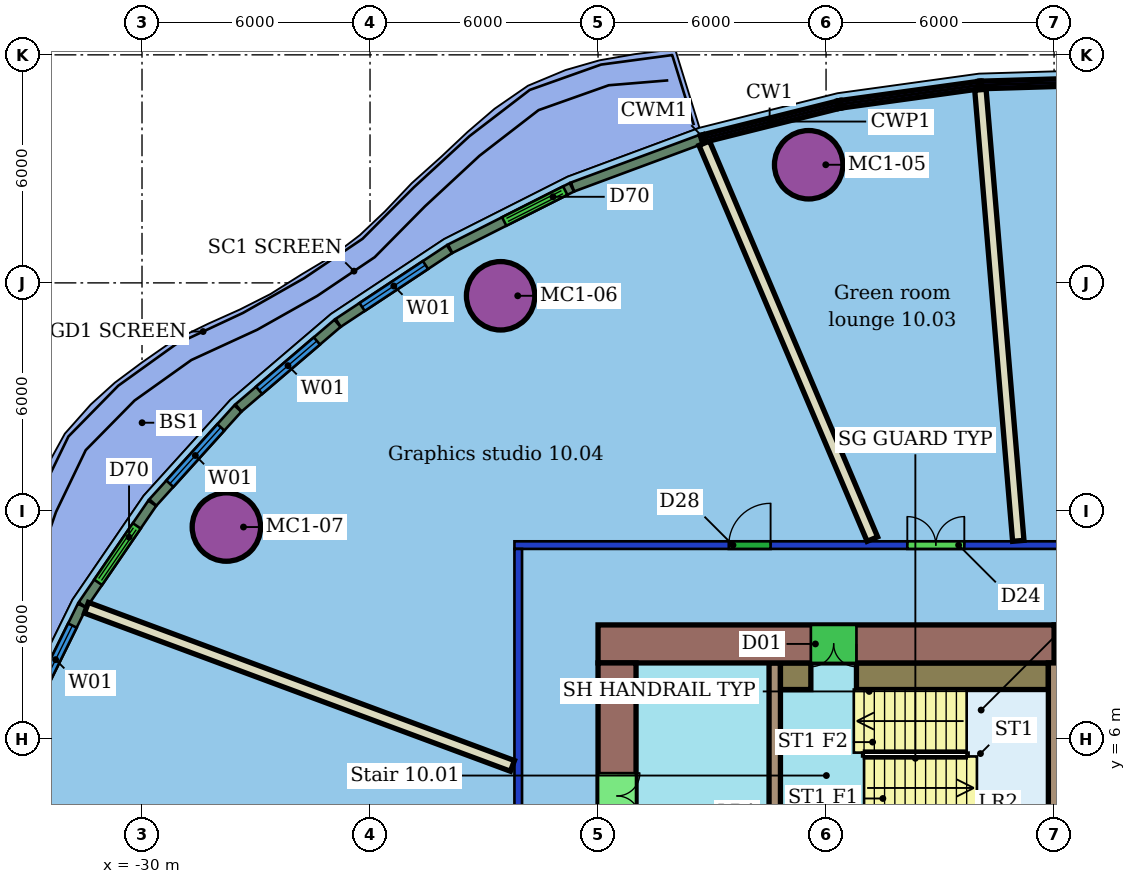
"""IFC4 building model, lengths in metres.
Left out: names, types, materials, properties, quantities, classifications, styles, units other than length and angle.
Written with IfcOpenShell. Run it as: python <this file> out.ifc"""

import sys

from ifc_helpers import new_model, si_unit, direction, frame, frame_2d, origin, origin_2d, place, context, subcontext, project, spatial, rectangle, hollow_circle, extrude, element, fill, save


model = new_model("IFC4")
c1 = context("Model", 3, precision=1e-05, world=origin(), true_north=direction((0.0, 1.0)))
c2 = subcontext(c1, "Body", "Model", "MODEL_VIEW")
j1 = project(units=[si_unit("LENGTHUNIT", "METRE"), si_unit("PLANEANGLEUNIT", "RADIAN")], contexts=[c1])
p1 = place(None, origin())
s1 = spatial("IfcSite", under=j1, at=p1, CompositionType="ELEMENT")
p2 = place(p1, origin())
s2 = spatial("IfcBuilding", under=s1, at=p2, CompositionType="ELEMENT")
p3 = place(p2, frame((0.0, 0.0, 54.5)))
s3 = spatial("IfcBuildingStorey", under=s2, at=p3, CompositionType="ELEMENT", Elevation=54.5)
for number, where, z_axis, x_axis in (
    (1, (-12.458, 21.108, 0.0), (0.0, 0.0, 1.0), (1.0, 0.0, 0.0)),
    (2, (-20.563, 17.66, 0.0), (0.0, 0.0, 1.0), (1.0, 0.0, 0.0)),
    (3, (-27.78, 11.576, 0.0), (0.0, 0.0, 1.0), (1.0, 0.0, 0.0)),
):
    element("IfcColumn", number, at=place(p3, frame(where, z_axis=z_axis, x_axis=x_axis)), inside=s3, PredefinedType="COLUMN", context=c2, shape_type="SweptSolid", body=[
        extrude(hollow_circle(Radius=0.9, WallThickness=0.06, at=origin_2d()), origin(), (0.0, 0.0, 1.0), 3.55),
    ])
p4 = place(p3, frame((-20.1, -11.0, 0.0), z_axis=(0.0, 0.0, 1.0), x_axis=(0.0, 1.0, 0.0)))
e4 = element("IfcWall", 4, at=p4, inside=s3, PredefinedType="PARTITIONING", context=c2, shape_type="SweptSolid", body=[
    extrude(rectangle(XDim=22.0, YDim=0.2, at=frame_2d((11.0, 0.0))), origin(), (0.0, 0.0, 1.0), 2.85),
])
p5 = place(p4, frame((11.384, 0.0, 0.0)))
e5 = element("IfcOpeningElement", 5, at=p5, cuts=e4, PredefinedType="OPENING", context=c2, shape_type="SweptSolid", body=[
    extrude(rectangle(XDim=1.8, YDim=2.1, at=frame_2d((0.9, 1.05))), frame((0.0, 0.11, 0.0), z_axis=(0.0, -1.0, 0.0), x_axis=(1.0, 0.0, 0.0)), (0.0, 0.0, 1.0), 0.22),
])
p6 = place(p3, frame((-20.2, 11.1, 0.0), z_axis=(0.0, 0.0, 1.0), x_axis=(1.0, 0.0, 0.0)))
e6 = element("IfcWall", 6, at=p6, inside=s3, PredefinedType="PARTITIONING", context=c2, shape_type="SweptSolid", body=[
    extrude(rectangle(XDim=28.4, YDim=0.2, at=frame_2d((14.2, 0.0))), origin(), (0.0, 0.0, 1.0), 2.85),
])
p7 = place(p6, frame((24.567, 0.0, 0.0)))
e7 = element("IfcOpeningElement", 7, at=p7, cuts=e6, PredefinedType="OPENING", context=c2, shape_type="SweptSolid", body=[
    extrude(rectangle(XDim=1.1, YDim=2.1, at=frame_2d((0.55, 1.05))), frame((0.0, 0.11, 0.0), z_axis=(0.0, -1.0, 0.0), x_axis=(1.0, 0.0, 0.0)), (0.0, 0.0, 1.0), 0.22),
])
p8 = place(p6, frame((19.115, 0.0, 0.0)))
e8 = element("IfcOpeningElement", 8, at=p8, cuts=e6, PredefinedType="OPENING", context=c2, shape_type="SweptSolid", body=[
    extrude(rectangle(XDim=1.2, YDim=2.1, at=frame_2d((0.6, 1.05))), frame((0.0, 0.11, 0.0), z_axis=(0.0, -1.0, 0.0), x_axis=(1.0, 0.0, 0.0)), (0.0, 0.0, 1.0), 0.22),
])
p9 = place(p6, frame((10.338, 0.0, 0.0)))
e9 = element("IfcOpeningElement", 9, at=p9, cuts=e6, PredefinedType="OPENING", context=c2, shape_type="SweptSolid", body=[
    extrude(rectangle(XDim=1.5, YDim=2.1, at=frame_2d((0.75, 1.05))), frame((0.0, 0.11, 0.0), z_axis=(0.0, -1.0, 0.0), x_axis=(1.0, 0.0, 0.0)), (0.0, 0.0, 1.0), 0.22),
])
p10 = place(p6, frame((5.64, 0.0, 0.0)))
e10 = element("IfcOpeningElement", 10, at=p10, cuts=e6, PredefinedType="OPENING", context=c2, shape_type="SweptSolid", body=[
    extrude(rectangle(XDim=1.1, YDim=2.1, at=frame_2d((0.55, 1.05))), frame((0.0, 0.11, 0.0), z_axis=(0.0, -1.0, 0.0), x_axis=(1.0, 0.0, 0.0)), (0.0, 0.0, 1.0), 0.22),
])
p11 = place(p3, frame((-7.938, 23.082, 0.0), z_axis=(0.0, 0.0, 1.0), x_axis=(0.083668001416, -0.996493685649, 0.0)))
e11 = element("IfcWall", 11, at=p11, inside=s3, PredefinedType="PARTITIONING", context=c2, shape_type="SweptSolid", body=[
    extrude(rectangle(XDim=11.911, YDim=0.3, at=frame_2d((5.956, 0.0))), origin(), (0.0, 0.0, 1.0), 3.55),
])
p12 = place(p3, frame((-15.205, 21.675, 0.0), z_axis=(0.0, 0.0, 1.0), x_axis=(0.39088389437, -0.920439993222, 0.0)))
e12 = element("IfcWall", 12, at=p12, inside=s3, PredefinedType="PARTITIONING", context=c2, shape_type="SweptSolid", body=[
    extrude(rectangle(XDim=11.317, YDim=0.3, at=frame_2d((5.658, 0.0))), origin(), (0.0, 0.0, 1.0), 3.55),
])
p13 = place(p3, frame((-31.462, 9.452, 0.0), z_axis=(0.0, 0.0, 1.0), x_axis=(0.937492850548, -0.348004533262, 0.0)))
e13 = element("IfcWall", 13, at=p13, inside=s3, PredefinedType="PARTITIONING", context=c2, shape_type="SweptSolid", body=[
    extrude(rectangle(XDim=11.957, YDim=0.3, at=frame_2d((5.979, 0.0))), origin(), (0.0, 0.0, 1.0), 3.55),
])
p14 = place(p3, frame((-15.294, 21.775, 0.0), z_axis=(0.0, 0.0, 1.0), x_axis=(-0.937607214699, -0.347696291244, 0.0)))
e14 = element("IfcWall", 14, at=p14, inside=s3, PredefinedType="SOLIDWALL", context=c2, shape_type="SweptSolid", body=[
    extrude(rectangle(XDim=3.601, YDim=0.25, at=frame_2d((1.801, 0.0))), origin(), (0.0, 0.0, 1.0), 3.15),
])
p15 = place(p3, frame((-18.691, 20.514, 0.0), z_axis=(0.0, 0.0, 1.0), x_axis=(-0.892553821927, -0.45094087746, 0.0)))
e15 = element("IfcWall", 15, at=p15, inside=s3, PredefinedType="SOLIDWALL", context=c2, shape_type="SweptSolid", body=[
    extrude(rectangle(XDim=3.586, YDim=0.25, at=frame_2d((1.793, 0.0))), origin(), (0.0, 0.0, 1.0), 3.15),
])
p16 = place(p15, frame((0.193, 0.0, 0.0)))
e16 = element("IfcOpeningElement", 16, at=p16, cuts=e15, PredefinedType="OPENING", context=c2, shape_type="SweptSolid", body=[
    extrude(rectangle(XDim=1.8, YDim=2.4, at=frame_2d((0.9, 1.2))), frame((0.0, 0.135, 0.0), z_axis=(0.0, -1.0, 0.0), x_axis=(1.0, 0.0, 0.0)), (0.0, 0.0, 1.0), 0.27),
])
p17 = place(p3, frame((-21.911, 18.886, 0.0), z_axis=(0.0, 0.0, 1.0), x_axis=(-0.833854064254, -0.551984963135, 0.0)))
e17 = element("IfcWall", 17, at=p17, inside=s3, PredefinedType="SOLIDWALL", context=c2, shape_type="SweptSolid", body=[
    extrude(rectangle(XDim=3.51, YDim=0.25, at=frame_2d((1.755, 0.0))), origin(), (0.0, 0.0, 1.0), 3.15),
])
p18 = place(p17, frame((0.755, 0.0, 0.8)))
e18 = element("IfcOpeningElement", 18, at=p18, cuts=e17, PredefinedType="OPENING", context=c2, shape_type="SweptSolid", body=[
    extrude(rectangle(XDim=2.0, YDim=2.2, at=frame_2d((1.0, 1.1))), frame((0.0, 0.135, 0.0), z_axis=(0.0, -1.0, 0.0), x_axis=(1.0, 0.0, 0.0)), (0.0, 0.0, 1.0), 0.27),
])
p19 = place(p3, frame((-24.856, 16.935, 0.0), z_axis=(0.0, 0.0, 1.0), x_axis=(-0.760387612855, -0.649469536019, 0.0)))
e19 = element("IfcWall", 19, at=p19, inside=s3, PredefinedType="SOLIDWALL", context=c2, shape_type="SweptSolid", body=[
    extrude(rectangle(XDim=3.425, YDim=0.25, at=frame_2d((1.712, 0.0))), origin(), (0.0, 0.0, 1.0), 3.15),
])
p20 = place(p19, frame((0.712, 0.0, 0.8)))
e20 = element("IfcOpeningElement", 20, at=p20, cuts=e19, PredefinedType="OPENING", context=c2, shape_type="SweptSolid", body=[
    extrude(rectangle(XDim=2.0, YDim=2.2, at=frame_2d((1.0, 1.1))), frame((0.0, 0.135, 0.0), z_axis=(0.0, -1.0, 0.0), x_axis=(1.0, 0.0, 0.0)), (0.0, 0.0, 1.0), 0.27),
])
p21 = place(p3, frame((-27.478, 14.693, 0.0), z_axis=(0.0, 0.0, 1.0), x_axis=(-0.670965097122, -0.74148893346, 0.0)))
e21 = element("IfcWall", 21, at=p21, inside=s3, PredefinedType="SOLIDWALL", context=c2, shape_type="SweptSolid", body=[
    extrude(rectangle(XDim=3.334, YDim=0.25, at=frame_2d((1.667, 0.0))), origin(), (0.0, 0.0, 1.0), 3.15),
])
p22 = place(p21, frame((0.667, 0.0, 0.8)))
e22 = element("IfcOpeningElement", 22, at=p22, cuts=e21, PredefinedType="OPENING", context=c2, shape_type="SweptSolid", body=[
    extrude(rectangle(XDim=2.0, YDim=2.2, at=frame_2d((1.0, 1.1))), frame((0.0, 0.135, 0.0), z_axis=(0.0, -1.0, 0.0), x_axis=(1.0, 0.0, 0.0)), (0.0, 0.0, 1.0), 0.27),
])
p23 = place(p3, frame((-29.73, 12.202, 0.0), z_axis=(0.0, 0.0, 1.0), x_axis=(-0.564924055241, -0.825142903872, 0.0)))
e23 = element("IfcWall", 23, at=p23, inside=s3, PredefinedType="SOLIDWALL", context=c2, shape_type="SweptSolid", body=[
    extrude(rectangle(XDim=3.243, YDim=0.25, at=frame_2d((1.622, 0.0))), origin(), (0.0, 0.0, 1.0), 3.15),
])
p24 = place(p23, frame((0.722, 0.0, 0.0)))
e24 = element("IfcOpeningElement", 24, at=p24, cuts=e23, PredefinedType="OPENING", context=c2, shape_type="SweptSolid", body=[
    extrude(rectangle(XDim=1.8, YDim=2.4, at=frame_2d((0.9, 1.2))), frame((0.0, 0.135, 0.0), z_axis=(0.0, -1.0, 0.0), x_axis=(1.0, 0.0, 0.0)), (0.0, 0.0, 1.0), 0.27),
])
p25 = place(p3, frame((-31.575, 9.503, 0.0), z_axis=(0.0, 0.0, 1.0), x_axis=(-0.442106876823, -0.896962379069, 0.0)))
e25 = element("IfcWall", 25, at=p25, inside=s3, PredefinedType="SOLIDWALL", context=c2, shape_type="SweptSolid", body=[
    extrude(rectangle(XDim=3.16, YDim=0.25, at=frame_2d((1.58, 0.0))), origin(), (0.0, 0.0, 1.0), 3.15),
])
p26 = place(p25, frame((0.58, 0.0, 0.8)))
e26 = element("IfcOpeningElement", 26, at=p26, cuts=e25, PredefinedType="OPENING", context=c2, shape_type="SweptSolid", body=[
    extrude(rectangle(XDim=2.0, YDim=2.2, at=frame_2d((1.0, 1.1))), frame((0.0, 0.135, 0.0), z_axis=(0.0, -1.0, 0.0), x_axis=(1.0, 0.0, 0.0)), (0.0, 0.0, 1.0), 0.27),
])
p27 = place(p3, frame((6.0, 8.5, 0.0), z_axis=(0.0, 0.0, 1.0), x_axis=(-1.0, 0.0, 0.0)))
e27 = element("IfcWall", 27, at=p27, inside=s3, PredefinedType="SHEAR", context=c2, shape_type="SweptSolid", body=[
    extrude(rectangle(XDim=12.0, YDim=1.0, at=frame_2d((6.0, 0.0))), origin(), (0.0, 0.0, 1.0), 3.4),
])
p28 = place(p27, frame((5.6, 0.0, 0.0)))
e28 = element("IfcOpeningElement", 28, at=p28, cuts=e27, PredefinedType="OPENING", context=c2, shape_type="SweptSolid", body=[
    extrude(rectangle(XDim=1.2, YDim=2.1, at=frame_2d((0.6, 1.05))), frame((0.0, 0.51, 0.0), z_axis=(0.0, -1.0, 0.0), x_axis=(1.0, 0.0, 0.0)), (0.0, 0.0, 1.0), 1.02),
])
p29 = place(p3, frame((-6.0, 8.5, 0.0), z_axis=(0.0, 0.0, 1.0), x_axis=(-1.0, 0.0, 0.0)))
e29 = element("IfcWall", 29, at=p29, inside=s3, PredefinedType="SHEAR", context=c2, shape_type="SweptSolid", body=[
    extrude(rectangle(XDim=12.0, YDim=1.0, at=frame_2d((6.0, 0.0))), origin(), (0.0, 0.0, 1.0), 3.4),
])
p30 = place(p29, frame((5.2, 0.0, 0.0)))
e30 = element("IfcOpeningElement", 30, at=p30, cuts=e29, PredefinedType="OPENING", context=c2, shape_type="SweptSolid", body=[
    extrude(rectangle(XDim=1.2, YDim=2.1, at=frame_2d((0.6, 1.05))), frame((0.0, 0.51, 0.0), z_axis=(0.0, -1.0, 0.0), x_axis=(1.0, 0.0, 0.0)), (0.0, 0.0, 1.0), 1.02),
])
p31 = place(p3, frame((-17.5, 8.0, 0.0), z_axis=(0.0, 0.0, 1.0), x_axis=(0.0, -1.0, 0.0)))
e31 = element("IfcWall", 31, at=p31, inside=s3, PredefinedType="SHEAR", context=c2, shape_type="SweptSolid", body=[
    extrude(rectangle(XDim=16.0, YDim=1.0, at=frame_2d((8.0, 0.0))), origin(), (0.0, 0.0, 1.0), 3.4),
])
p32 = place(p31, frame((11.9, 0.0, 0.0)))
e32 = element("IfcOpeningElement", 32, at=p32, cuts=e31, PredefinedType="OPENING", context=c2, shape_type="SweptSolid", body=[
    extrude(rectangle(XDim=1.2, YDim=2.1, at=frame_2d((0.6, 1.05))), frame((0.0, 0.51, 0.0), z_axis=(0.0, -1.0, 0.0), x_axis=(1.0, 0.0, 0.0)), (0.0, 0.0, 1.0), 1.02),
])
p33 = place(p31, frame((2.9, 0.0, 0.0)))
e33 = element("IfcOpeningElement", 33, at=p33, cuts=e31, PredefinedType="OPENING", context=c2, shape_type="SweptSolid", body=[
    extrude(rectangle(XDim=1.2, YDim=2.1, at=frame_2d((0.6, 1.05))), frame((0.0, 0.51, 0.0), z_axis=(0.0, -1.0, 0.0), x_axis=(1.0, 0.0, 0.0)), (0.0, 0.0, 1.0), 1.02),
])
p34 = place(p3, frame((-13.35, 8.0, 0.0), z_axis=(0.0, 0.0, 1.0), x_axis=(0.0, -1.0, 0.0)))
e34 = element("IfcWall", 34, at=p34, inside=s3, PredefinedType="SHEAR", context=c2, shape_type="SweptSolid", body=[
    extrude(rectangle(XDim=16.0, YDim=0.3, at=frame_2d((8.0, 0.0))), origin(), (0.0, 0.0, 1.0), 3.4),
])
p35 = place(p34, frame((7.25, 0.0, 0.0)))
e35 = element("IfcOpeningElement", 35, at=p35, cuts=e34, PredefinedType="OPENING", context=c2, shape_type="SweptSolid", body=[
    extrude(rectangle(XDim=1.5, YDim=2.1, at=frame_2d((0.75, 1.05))), frame((0.0, 0.16, 0.0), z_axis=(0.0, -1.0, 0.0), x_axis=(1.0, 0.0, 0.0)), (0.0, 0.0, 1.0), 0.32),
])
p36 = place(p3, frame((-6.0, 3.88, 0.0), z_axis=(0.0, 0.0, 1.0), x_axis=(0.0, 1.0, 0.0)))
e36 = element("IfcWall", 36, at=p36, inside=s3, PredefinedType="SHEAR", context=c2, shape_type="SweptSolid", body=[
    extrude(rectangle(XDim=4.12, YDim=0.3, at=frame_2d((2.06, 0.0))), origin(), (0.0, 0.0, 1.0), 3.4),
])
p37 = place(p3, frame((-13.2, 7.65, 0.0), z_axis=(0.0, 0.0, 1.0), x_axis=(1.0, 0.0, 0.0)))
e37 = element("IfcWall", 37, at=p37, inside=s3, PredefinedType="SHEAR", context=c2, shape_type="SweptSolid", body=[
    extrude(rectangle(XDim=0.8, YDim=0.7, at=frame_2d((0.4, 0.0))), origin(), (0.0, 0.0, 1.0), 3.4),
])
p38 = place(p3, frame((-11.2, 7.65, 0.0), z_axis=(0.0, 0.0, 1.0), x_axis=(1.0, 0.0, 0.0)))
e38 = element("IfcWall", 38, at=p38, inside=s3, PredefinedType="SHEAR", context=c2, shape_type="SweptSolid", body=[
    extrude(rectangle(XDim=5.05, YDim=0.7, at=frame_2d((2.525, 0.0))), origin(), (0.0, 0.0, 1.0), 3.4),
])
p39 = place(p9, origin())
e39 = element("IfcDoor", 39, at=p39, inside=s3, OperationType="DOUBLE_DOOR_SINGLE_SWING", PredefinedType="DOOR", context=c2, shape_type="SweptSolid", body=[
    extrude(rectangle(XDim=1.5, YDim=2.1, at=frame_2d((0.75, 1.05))), frame((0.0, 0.025, 0.0), z_axis=(0.0, -1.0, 0.0), x_axis=(1.0, 0.0, 0.0)), (0.0, 0.0, 1.0), 0.05),
])
fill(e9, e39)
p40 = place(p10, origin())
e40 = element("IfcDoor", 40, at=p40, inside=s3, OperationType="SINGLE_SWING_RIGHT", PredefinedType="DOOR", context=c2, shape_type="SweptSolid", body=[
    extrude(rectangle(XDim=1.1, YDim=2.1, at=frame_2d((0.55, 1.05))), frame((0.0, 0.025, 0.0), z_axis=(0.0, -1.0, 0.0), x_axis=(1.0, 0.0, 0.0)), (0.0, 0.0, 1.0), 0.05),
])
fill(e10, e40)
p41 = place(p16, origin())
e41 = element("IfcDoor", 41, at=p41, inside=s3, OperationType="DOUBLE_DOOR_SLIDING", PredefinedType="DOOR", context=c2, shape_type="SweptSolid", body=[
    extrude(rectangle(XDim=1.8, YDim=2.4, at=frame_2d((0.9, 1.2))), frame((0.0, 0.025, 0.0), z_axis=(0.0, -1.0, 0.0), x_axis=(1.0, 0.0, 0.0)), (0.0, 0.0, 1.0), 0.05),
])
fill(e16, e41)
p42 = place(p18, origin())
e42 = element("IfcWindow", 42, at=p42, inside=s3, PartitioningType="SINGLE_PANEL", PredefinedType="WINDOW", context=c2, shape_type="SweptSolid", body=[
    extrude(rectangle(XDim=2.0, YDim=2.2, at=frame_2d((1.0, 1.1))), frame((0.0, 0.03, 0.0), z_axis=(0.0, -1.0, 0.0), x_axis=(1.0, 0.0, 0.0)), (0.0, 0.0, 1.0), 0.06),
])
fill(e18, e42)
p43 = place(p20, origin())
e43 = element("IfcWindow", 43, at=p43, inside=s3, PartitioningType="SINGLE_PANEL", PredefinedType="WINDOW", context=c2, shape_type="SweptSolid", body=[
    extrude(rectangle(XDim=2.0, YDim=2.2, at=frame_2d((1.0, 1.1))), frame((0.0, 0.03, 0.0), z_axis=(0.0, -1.0, 0.0), x_axis=(1.0, 0.0, 0.0)), (0.0, 0.0, 1.0), 0.06),
])
fill(e20, e43)
p44 = place(p22, origin())
e44 = element("IfcWindow", 44, at=p44, inside=s3, PartitioningType="SINGLE_PANEL", PredefinedType="WINDOW", context=c2, shape_type="SweptSolid", body=[
    extrude(rectangle(XDim=2.0, YDim=2.2, at=frame_2d((1.0, 1.1))), frame((0.0, 0.03, 0.0), z_axis=(0.0, -1.0, 0.0), x_axis=(1.0, 0.0, 0.0)), (0.0, 0.0, 1.0), 0.06),
])
fill(e22, e44)
p45 = place(p24, origin())
e45 = element("IfcDoor", 45, at=p45, inside=s3, OperationType="DOUBLE_DOOR_SLIDING", PredefinedType="DOOR", context=c2, shape_type="SweptSolid", body=[
    extrude(rectangle(XDim=1.8, YDim=2.4, at=frame_2d((0.9, 1.2))), frame((0.0, 0.025, 0.0), z_axis=(0.0, -1.0, 0.0), x_axis=(1.0, 0.0, 0.0)), (0.0, 0.0, 1.0), 0.05),
])
fill(e24, e45)
p46 = place(p26, origin())
e46 = element("IfcWindow", 46, at=p46, inside=s3, PartitioningType="SINGLE_PANEL", PredefinedType="WINDOW", context=c2, shape_type="SweptSolid", body=[
    extrude(rectangle(XDim=2.0, YDim=2.2, at=frame_2d((1.0, 1.1))), frame((0.0, 0.03, 0.0), z_axis=(0.0, -1.0, 0.0), x_axis=(1.0, 0.0, 0.0)), (0.0, 0.0, 1.0), 0.06),
])
fill(e26, e46)
p47 = place(p30, origin())
e47 = element("IfcDoor", 47, at=p47, inside=s3, OperationType="DOUBLE_DOOR_SINGLE_SWING", PredefinedType="NOTDEFINED", context=c2, shape_type="SweptSolid", body=[
    extrude(rectangle(XDim=1.2, YDim=2.1, at=frame_2d((0.6, 1.05))), frame((0.0, 0.025, 0.0), z_axis=(0.0, -1.0, 0.0), x_axis=(1.0, 0.0, 0.0)), (0.0, 0.0, 1.0), 0.05),
])
fill(e30, e47)
p48 = place(p33, origin())
e48 = element("IfcDoor", 48, at=p48, inside=s3, OperationType="DOUBLE_DOOR_SINGLE_SWING", PredefinedType="NOTDEFINED", context=c2, shape_type="SweptSolid", body=[
    extrude(rectangle(XDim=1.2, YDim=2.1, at=frame_2d((0.6, 1.05))), frame((0.0, 0.025, 0.0), z_axis=(0.0, -1.0, 0.0), x_axis=(1.0, 0.0, 0.0)), (0.0, 0.0, 1.0), 0.05),
])
fill(e33, e48)
save(model, sys.argv[1])
